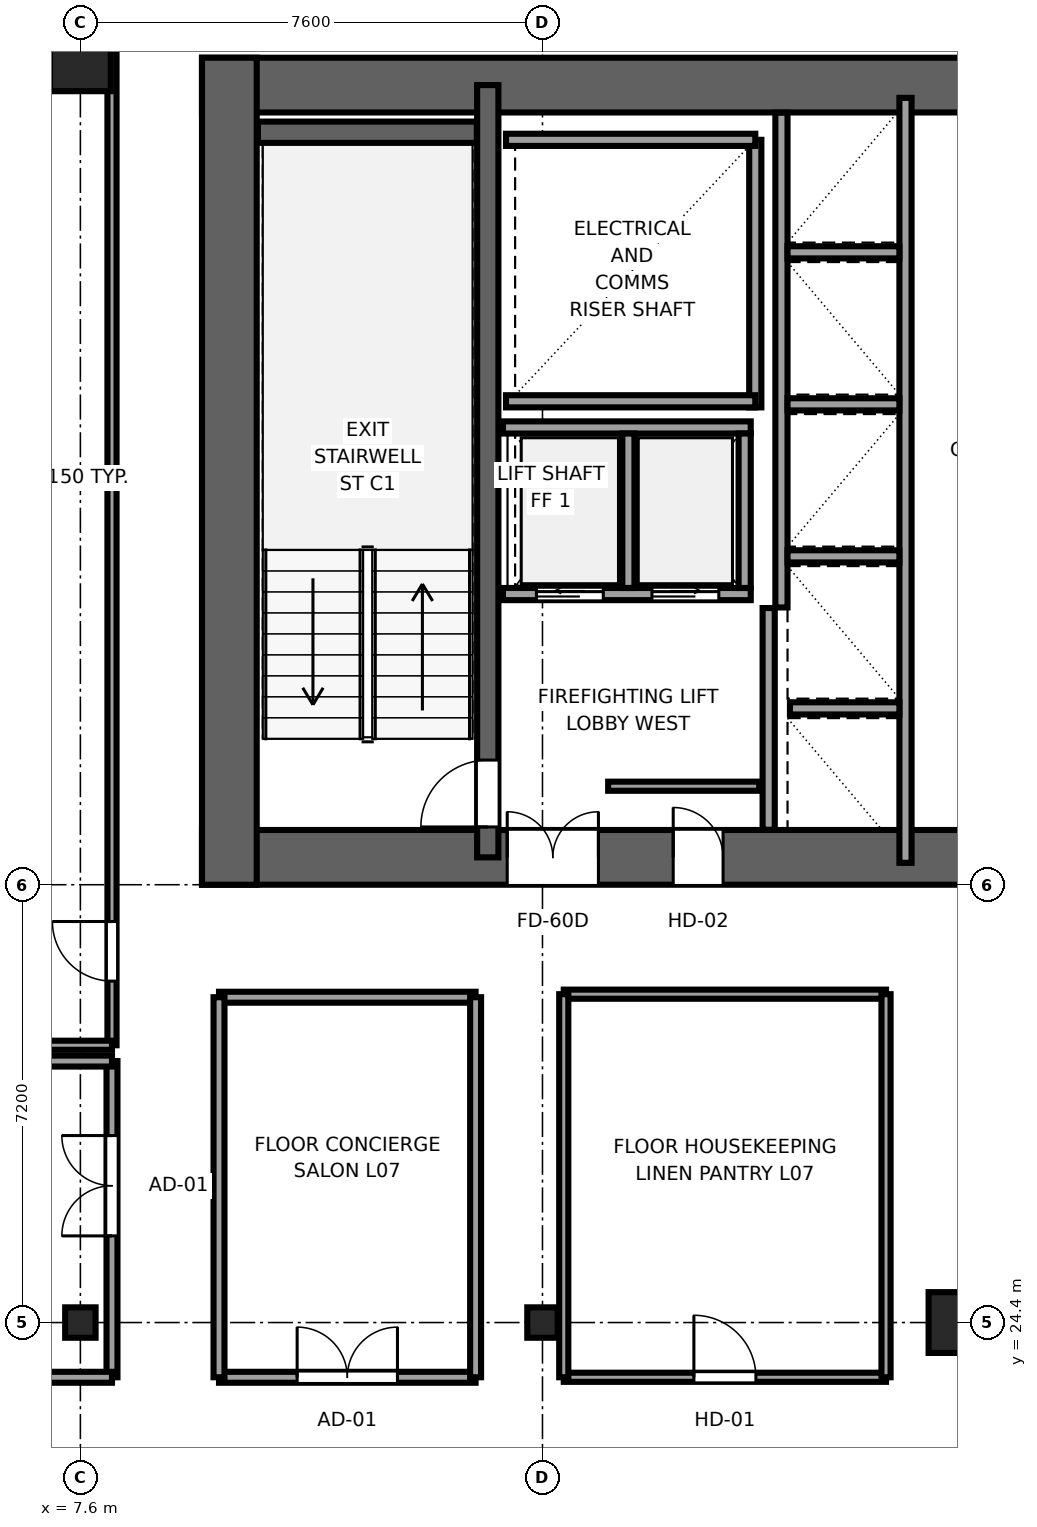
"""IFC4 building model, lengths in metres.
Left out: names, types, materials, properties, quantities, classifications, styles, units other than length and angle.
Written with IfcOpenShell. Run it as: python <this file> out.ifc"""

import sys

from ifc_helpers import new_model, si_unit, direction, frame, frame_2d, origin, origin_2d, place, context, subcontext, project, spatial, rectangle, i_section, extrude, source, transform, mapped, element, fill, save


model = new_model("IFC4")
c1 = context("Model", 3, precision=1e-05, world=origin(), true_north=direction((0.0, 1.0)))
c2 = subcontext(c1, "Body", "Model", "MODEL_VIEW")
j1 = project(units=[si_unit("LENGTHUNIT", "METRE"), si_unit("PLANEANGLEUNIT", "RADIAN")], contexts=[c1])
p1 = place(None, origin())
s1 = spatial("IfcSite", under=j1, at=p1, CompositionType="ELEMENT")
p2 = place(p1, origin())
s2 = spatial("IfcBuilding", under=s1, at=p2, CompositionType="ELEMENT")
p3 = place(p2, frame((0.0, 0.0, 35.55)))
s3 = spatial("IfcBuildingStorey", under=s2, at=p3, CompositionType="ELEMENT", Elevation=35.55)
p4 = place(p3, frame((9.6, 32.05, 0.0), z_axis=(0.0, 0.0, 1.0), x_axis=(1.0, 0.0, 0.0)))
e1 = element("IfcWall", 1, at=p4, inside=s3, PredefinedType="SHEAR", context=c2, shape_type="SweptSolid", body=[
    extrude(rectangle(XDim=26.8, YDim=0.9, at=frame_2d((13.4, 0.0))), origin(), (0.0, 0.0, 1.0), 3.55),
])
p5 = place(p4, frame((6.52, 0.0, 0.0), z_axis=(0.0, 0.0, 1.0), x_axis=(-1.0, 0.0, 0.0)))
e2 = element("IfcOpeningElement", 2, at=p5, cuts=e1, PredefinedType="OPENING", context=c2, shape_type="SweptSolid", body=[
    extrude(rectangle(XDim=1.5, YDim=2.04, at=frame_2d((0.75, 1.02))), frame((0.0, 0.46, 0.0), z_axis=(0.0, -1.0, 0.0), x_axis=(1.0, 0.0, 0.0)), (0.0, 0.0, 1.0), 0.92),
])
p6 = place(p4, frame((14.15, 0.0, 0.0), z_axis=(0.0, 0.0, 1.0), x_axis=(-1.0, 0.0, 0.0)))
e3 = element("IfcOpeningElement", 3, at=p6, cuts=e1, PredefinedType="OPENING", context=c2, shape_type="SweptSolid", body=[
    extrude(rectangle(XDim=1.5, YDim=2.04, at=frame_2d((0.75, 1.02))), frame((0.0, 0.46, 0.0), z_axis=(0.0, -1.0, 0.0), x_axis=(1.0, 0.0, 0.0)), (0.0, 0.0, 1.0), 0.92),
])
p7 = place(p4, frame((20.45, 0.0, 0.0), z_axis=(0.0, 0.0, 1.0), x_axis=(-1.0, 0.0, 0.0)))
e4 = element("IfcOpeningElement", 4, at=p7, cuts=e1, PredefinedType="OPENING", context=c2, shape_type="SweptSolid", body=[
    extrude(rectangle(XDim=1.5, YDim=2.04, at=frame_2d((0.75, 1.02))), frame((0.0, 0.46, 0.0), z_axis=(0.0, -1.0, 0.0), x_axis=(1.0, 0.0, 0.0)), (0.0, 0.0, 1.0), 0.92),
])
p8 = place(p4, frame((8.57, 0.0, 0.0), z_axis=(0.0, 0.0, 1.0), x_axis=(-1.0, 0.0, 0.0)))
e5 = element("IfcOpeningElement", 5, at=p8, cuts=e1, PredefinedType="OPENING", context=c2, shape_type="SweptSolid", body=[
    extrude(rectangle(XDim=0.82, YDim=2.01, at=frame_2d((0.41, 1.005))), frame((0.0, 0.46, 0.0), z_axis=(0.0, -1.0, 0.0), x_axis=(1.0, 0.0, 0.0)), (0.0, 0.0, 1.0), 0.92),
])
p9 = place(p3, frame((9.6, 44.75, 0.0), z_axis=(0.0, 0.0, 1.0), x_axis=(1.0, 0.0, 0.0)))
e6 = element("IfcWall", 6, at=p9, inside=s3, PredefinedType="SHEAR", context=c2, shape_type="SweptSolid", body=[
    extrude(rectangle(XDim=26.8, YDim=0.9, at=frame_2d((13.4, 0.0))), origin(), (0.0, 0.0, 1.0), 3.55),
])
p10 = place(p3, frame((10.05, 31.6, 0.0), z_axis=(0.0, 0.0, 1.0), x_axis=(0.0, 1.0, 0.0)))
e7 = element("IfcWall", 7, at=p10, inside=s3, PredefinedType="SHEAR", context=c2, shape_type="SweptSolid", body=[
    extrude(rectangle(XDim=13.6, YDim=0.9, at=frame_2d((6.8, 0.0))), origin(), (0.0, 0.0, 1.0), 3.55),
])
p11 = place(p3, frame((14.3, 32.05, 0.0), z_axis=(0.0, 0.0, 1.0), x_axis=(0.0, 1.0, 0.0)))
e8 = element("IfcWall", 8, at=p11, inside=s3, PredefinedType="SHEAR", context=c2, shape_type="SweptSolid", body=[
    extrude(rectangle(XDim=12.7, YDim=0.35, at=frame_2d((6.35, 0.0))), origin(), (0.0, 0.0, 1.0), 3.55),
])
p12 = place(p11, frame((0.5, 0.0, 0.0)))
e9 = element("IfcOpeningElement", 9, at=p12, cuts=e8, PredefinedType="OPENING", context=c2, shape_type="SweptSolid", body=[
    extrude(rectangle(XDim=1.1, YDim=2.12, at=frame_2d((0.55, 1.06))), frame((0.0, 0.185, 0.0), z_axis=(0.0, -1.0, 0.0), x_axis=(1.0, 0.0, 0.0)), (0.0, 0.0, 1.0), 0.37),
])
p13 = place(p3, frame((10.52, 43.975, 0.0), z_axis=(0.0, 0.0, 1.0), x_axis=(1.0, 0.0, 0.0)))
e10 = element("IfcWall", 10, at=p13, inside=s3, PredefinedType="SHEAR", context=c2, shape_type="SweptSolid", body=[
    extrude(rectangle(XDim=3.6, YDim=0.35, at=frame_2d((1.8, 0.0))), origin(), (0.0, 0.0, 1.0), 3.55),
])
m1 = source(origin(), c2, "Body", "SweptSolid", [
    extrude(i_section(OverallWidth=0.5, OverallDepth=0.5, WebThickness=0.028, FlangeThickness=0.045, at=origin_2d()), origin(), (0.0, 0.0, 1.0), 3.55),
])
for number, where, z_axis, x_axis in (
    (11, (7.6, 24.4, 0.0), (0.0, 0.0, 1.0), (1.0, 0.0, 0.0)),
    (12, (15.2, 24.4, 0.0), (0.0, 0.0, 1.0), (1.0, 0.0, 0.0)),
):
    element("IfcColumn", number, at=place(p3, frame(where, z_axis=z_axis, x_axis=x_axis)), inside=s3, PredefinedType="COLUMN", context=c2, shape_type="MappedRepresentation", body=[
        mapped(m1, transform((0.0, 0.0, 0.0), x_axis=(1.0, 0.0, 0.0), y_axis=(0.0, 1.0, 0.0), z_axis=(0.0, 0.0, 1.0), scale=1.0)),
    ])
m2 = source(origin(), c2, "Body", "SweptSolid", [
    extrude(rectangle(XDim=1.0, YDim=1.0, at=origin_2d()), origin(), (0.0, 0.0, 1.0), 3.55),
])
for number, where, z_axis, x_axis in (
    (13, (22.05, 24.4, 0.0), (0.0, 0.0, 1.0), (1.0, 0.0, 0.0)),
    (14, (7.6, 45.15, 0.0), (0.0, 0.0, 1.0), (1.0, 0.0, 0.0)),
):
    element("IfcColumn", number, at=place(p3, frame(where, z_axis=z_axis, x_axis=x_axis)), inside=s3, PredefinedType="COLUMN", context=c2, shape_type="MappedRepresentation", body=[
        mapped(m2, transform((0.0, 0.0, 0.0), x_axis=(1.0, 0.0, 0.0), y_axis=(0.0, 1.0, 0.0), z_axis=(0.0, 0.0, 1.0), scale=1.0)),
    ])
p14 = place(p3, frame((18.7, 39.45, 0.0), z_axis=(0.0, 0.0, 1.0), x_axis=(0.0, 1.0, 0.0)))
e15 = element("IfcWall", 15, at=p14, inside=s3, PredefinedType="SOLIDWALL", context=c2, shape_type="SweptSolid", body=[
    extrude(rectangle(XDim=4.4, YDim=0.2, at=frame_2d((2.2, 0.0))), origin(), (0.0, 0.0, 1.0), 3.37),
])
for number, where, z_axis, x_axis in (
    (16, (14.6, 39.55, 0.0), (0.0, 0.0, 1.0), (1.0, 0.0, 0.0)),
    (17, (14.6, 43.85, 0.0), (0.0, 0.0, 1.0), (1.0, 0.0, 0.0)),
):
    element("IfcWall", number, at=place(p3, frame(where, z_axis=z_axis, x_axis=x_axis)), inside=s3, PredefinedType="SOLIDWALL", context=c2, shape_type="SweptSolid", body=[
        extrude(rectangle(XDim=4.1, YDim=0.2, at=frame_2d((2.05, 0.0))), origin(), (0.0, 0.0, 1.0), 3.37),
    ])
p15 = place(p3, frame((18.92, 32.504, 0.0), z_axis=(0.0, 0.0, 1.0), x_axis=(0.0, 1.0, 0.0)))
e18 = element("IfcWall", 18, at=p15, inside=s3, PredefinedType="SOLIDWALL", context=c2, shape_type="SweptSolid", body=[
    extrude(rectangle(XDim=3.646, YDim=0.2, at=frame_2d((1.823, 0.0))), origin(), (0.0, 0.0, 1.0), 3.37),
])
p16 = place(p3, frame((21.17, 31.96, 0.0), z_axis=(0.0, 0.0, 1.0), x_axis=(0.0, 1.0, 0.0)))
e19 = element("IfcWall", 19, at=p16, inside=s3, PredefinedType="SOLIDWALL", context=c2, shape_type="SweptSolid", body=[
    extrude(rectangle(XDim=12.58, YDim=0.2, at=frame_2d((6.29, 0.0))), origin(), (0.0, 0.0, 1.0), 3.37),
])
p17 = place(p3, frame((19.13, 36.16, 0.0), z_axis=(0.0, 0.0, 1.0), x_axis=(0.0, 1.0, 0.0)))
e20 = element("IfcWall", 20, at=p17, inside=s3, PredefinedType="SOLIDWALL", context=c2, shape_type="SweptSolid", body=[
    extrude(rectangle(XDim=8.136, YDim=0.2, at=frame_2d((4.068, 0.0))), origin(), (0.0, 0.0, 1.0), 3.37),
])
p18 = place(p3, frame((19.27, 34.5, 0.0), z_axis=(0.0, 0.0, 1.0), x_axis=(1.0, 0.0, 0.0)))
e21 = element("IfcWall", 21, at=p18, inside=s3, PredefinedType="SOLIDWALL", context=c2, shape_type="SweptSolid", body=[
    extrude(rectangle(XDim=1.8, YDim=0.2, at=frame_2d((0.9, 0.0))), origin(), (0.0, 0.0, 1.0), 3.37),
])
for number, where, z_axis, x_axis in (
    (22, (19.23, 37.0, 0.0), (0.0, 0.0, 1.0), (1.0, 0.0, 0.0)),
    (23, (19.23, 39.5, 0.0), (0.0, 0.0, 1.0), (1.0, 0.0, 0.0)),
    (24, (19.23, 42.0, 0.0), (0.0, 0.0, 1.0), (1.0, 0.0, 0.0)),
):
    element("IfcWall", number, at=place(p3, frame(where, z_axis=z_axis, x_axis=x_axis)), inside=s3, PredefinedType="SOLIDWALL", context=c2, shape_type="SweptSolid", body=[
        extrude(rectangle(XDim=1.84, YDim=0.2, at=frame_2d((0.92, 0.0))), origin(), (0.0, 0.0, 1.0), 3.37),
    ])
p19 = place(p3, frame((14.55, 36.38, 0.0), z_axis=(0.0, 0.0, 1.0), x_axis=(1.0, 0.0, 0.0)))
e25 = element("IfcWall", 25, at=p19, inside=s3, PredefinedType="SOLIDWALL", context=c2, shape_type="SweptSolid", body=[
    extrude(rectangle(XDim=4.075, YDim=0.2, at=frame_2d((2.038, 0.0))), origin(), (0.0, 0.0, 1.0), 3.37),
])
p20 = place(p19, frame((0.55, 0.0, 0.0)))
e26 = element("IfcOpeningElement", 26, at=p20, cuts=e25, PredefinedType="OPENING", context=c2, shape_type="SweptSolid", body=[
    extrude(rectangle(XDim=1.1, YDim=2.12, at=frame_2d((0.55, 1.06))), frame((0.0, 0.11, 0.0), z_axis=(0.0, -1.0, 0.0), x_axis=(1.0, 0.0, 0.0)), (0.0, 0.0, 1.0), 0.22),
])
p21 = place(p19, frame((2.45, 0.0, 0.0)))
e27 = element("IfcOpeningElement", 27, at=p21, cuts=e25, PredefinedType="OPENING", context=c2, shape_type="SweptSolid", body=[
    extrude(rectangle(XDim=1.1, YDim=2.12, at=frame_2d((0.55, 1.06))), frame((0.0, 0.11, 0.0), z_axis=(0.0, -1.0, 0.0), x_axis=(1.0, 0.0, 0.0)), (0.0, 0.0, 1.0), 0.22),
])
p22 = place(p3, frame((14.55, 39.12, 0.0), z_axis=(0.0, 0.0, 1.0), x_axis=(1.0, 0.0, 0.0)))
e28 = element("IfcWall", 28, at=p22, inside=s3, PredefinedType="SOLIDWALL", context=c2, shape_type="SweptSolid", body=[
    extrude(rectangle(XDim=4.075, YDim=0.2, at=frame_2d((2.038, 0.0))), origin(), (0.0, 0.0, 1.0), 3.37),
])
for number, where, z_axis, x_axis in (
    (29, (18.525, 36.48, 0.0), (0.0, 0.0, 1.0), (0.0, 1.0, 0.0)),
    (30, (16.613, 36.48, 0.0), (0.0, 0.0, 1.0), (0.0, 1.0, 0.0)),
):
    element("IfcWall", number, at=place(p3, frame(where, z_axis=z_axis, x_axis=x_axis)), inside=s3, PredefinedType="SOLIDWALL", context=c2, shape_type="SweptSolid", body=[
        extrude(rectangle(XDim=2.54, YDim=0.2, at=frame_2d((1.27, 0.0))), origin(), (0.0, 0.0, 1.0), 3.37),
    ])
p23 = place(p3, frame((16.28, 33.22, 0.0), z_axis=(0.0, 0.0, 1.0), x_axis=(1.0, 0.0, 0.0)))
e31 = element("IfcWall", 31, at=p23, inside=s3, PredefinedType="PARTITIONING", context=c2, shape_type="SweptSolid", body=[
    extrude(rectangle(XDim=2.485, YDim=0.15, at=frame_2d((1.242, 0.0))), origin(), (0.0, 0.0, 1.0), 3.37),
])
p24 = place(p3, frame((8.12, 23.5, 0.0), z_axis=(0.0, 0.0, 1.0), x_axis=(0.0, 1.0, 0.0)))
e32 = element("IfcWall", 32, at=p24, inside=s3, PredefinedType="PARTITIONING", context=c2, shape_type="SweptSolid", body=[
    extrude(rectangle(XDim=5.2, YDim=0.18, at=frame_2d((2.6, 0.0))), origin(), (0.0, 0.0, 1.0), 3.37),
])
p25 = place(p24, frame((2.325, 0.0, 0.0)))
e33 = element("IfcOpeningElement", 33, at=p25, cuts=e32, PredefinedType="OPENING", context=c2, shape_type="SweptSolid", body=[
    extrude(rectangle(XDim=1.65, YDim=2.15, at=frame_2d((0.825, 1.075))), frame((0.0, 0.1, 0.0), z_axis=(0.0, -1.0, 0.0), x_axis=(1.0, 0.0, 0.0)), (0.0, 0.0, 1.0), 0.2),
])
for number, where, z_axis, x_axis in (
    (34, (0.405, 23.5, 0.0), (0.0, 0.0, 1.0), (1.0, 0.0, 0.0)),
    (35, (0.405, 28.7, 0.0), (0.0, 0.0, 1.0), (1.0, 0.0, 0.0)),
):
    element("IfcWall", number, at=place(p3, frame(where, z_axis=z_axis, x_axis=x_axis)), inside=s3, PredefinedType="PARTITIONING", context=c2, shape_type="SweptSolid", body=[
        extrude(rectangle(XDim=7.715, YDim=0.18, at=frame_2d((3.857, 0.0))), origin(), (0.0, 0.0, 1.0), 3.37),
    ])
p26 = place(p3, frame((8.12, 28.96, 0.0), z_axis=(0.0, 0.0, 1.0), x_axis=(0.0, 1.0, 0.0)))
e36 = element("IfcWall", 36, at=p26, inside=s3, PredefinedType="PARTITIONING", context=c2, shape_type="SweptSolid", body=[
    extrude(rectangle(XDim=16.635, YDim=0.15, at=frame_2d((8.317, 0.0))), origin(), (0.0, 0.0, 1.0), 3.37),
])
p27 = place(p26, frame((1.055, 0.0, 0.0)))
e37 = element("IfcOpeningElement", 37, at=p27, cuts=e36, PredefinedType="OPENING", context=c2, shape_type="SweptSolid", body=[
    extrude(rectangle(XDim=0.98, YDim=2.12, at=frame_2d((0.49, 1.06))), frame((0.0, 0.085, 0.0), z_axis=(0.0, -1.0, 0.0), x_axis=(1.0, 0.0, 0.0)), (0.0, 0.0, 1.0), 0.17),
])
p28 = place(p3, frame((2.77, 28.96, 0.0), z_axis=(0.0, 0.0, 1.0), x_axis=(1.0, 0.0, 0.0)))
e38 = element("IfcWall", 38, at=p28, inside=s3, PredefinedType="PARTITIONING", context=c2, shape_type="SweptSolid", body=[
    extrude(rectangle(XDim=5.35, YDim=0.15, at=frame_2d((2.675, 0.0))), origin(), (0.0, 0.0, 1.0), 3.37),
])
p29 = place(p3, frame((9.88, 23.5, 0.0), z_axis=(0.0, 0.0, 1.0), x_axis=(1.0, 0.0, 0.0)))
e39 = element("IfcWall", 39, at=p29, inside=s3, PredefinedType="PARTITIONING", context=c2, shape_type="SweptSolid", body=[
    extrude(rectangle(XDim=4.22, YDim=0.18, at=frame_2d((2.11, 0.0))), origin(), (0.0, 0.0, 1.0), 3.37),
])
p30 = place(p29, frame((1.285, 0.0, 0.0)))
e40 = element("IfcOpeningElement", 40, at=p30, cuts=e39, PredefinedType="OPENING", context=c2, shape_type="SweptSolid", body=[
    extrude(rectangle(XDim=1.65, YDim=2.15, at=frame_2d((0.825, 1.075))), frame((0.0, 0.1, 0.0), z_axis=(0.0, -1.0, 0.0), x_axis=(1.0, 0.0, 0.0)), (0.0, 0.0, 1.0), 0.2),
])
p31 = place(p3, frame((9.88, 29.75, 0.0), z_axis=(0.0, 0.0, 1.0), x_axis=(1.0, 0.0, 0.0)))
e41 = element("IfcWall", 41, at=p31, inside=s3, PredefinedType="PARTITIONING", context=c2, shape_type="SweptSolid", body=[
    extrude(rectangle(XDim=4.22, YDim=0.18, at=frame_2d((2.11, 0.0))), origin(), (0.0, 0.0, 1.0), 3.37),
])
for number, where, z_axis, x_axis in (
    (42, (9.88, 23.5, 0.0), (0.0, 0.0, 1.0), (0.0, 1.0, 0.0)),
    (43, (14.1, 23.5, 0.0), (0.0, 0.0, 1.0), (0.0, 1.0, 0.0)),
):
    element("IfcWall", number, at=place(p3, frame(where, z_axis=z_axis, x_axis=x_axis)), inside=s3, PredefinedType="PARTITIONING", context=c2, shape_type="SweptSolid", body=[
        extrude(rectangle(XDim=6.25, YDim=0.18, at=frame_2d((3.125, 0.0))), origin(), (0.0, 0.0, 1.0), 3.37),
    ])
p32 = place(p3, frame((15.55, 23.5, 0.0), z_axis=(0.0, 0.0, 1.0), x_axis=(1.0, 0.0, 0.0)))
e44 = element("IfcWall", 44, at=p32, inside=s3, PredefinedType="PARTITIONING", context=c2, shape_type="SweptSolid", body=[
    extrude(rectangle(XDim=5.3, YDim=0.15, at=frame_2d((2.65, 0.0))), origin(), (0.0, 0.0, 1.0), 3.37),
])
p33 = place(p32, frame((2.14, 0.0, 0.0)))
e45 = element("IfcOpeningElement", 45, at=p33, cuts=e44, PredefinedType="OPENING", context=c2, shape_type="SweptSolid", body=[
    extrude(rectangle(XDim=1.02, YDim=2.03, at=frame_2d((0.51, 1.015))), frame((0.0, 0.085, 0.0), z_axis=(0.0, -1.0, 0.0), x_axis=(1.0, 0.0, 0.0)), (0.0, 0.0, 1.0), 0.17),
])
p34 = place(p3, frame((15.55, 29.8, 0.0), z_axis=(0.0, 0.0, 1.0), x_axis=(1.0, 0.0, 0.0)))
e46 = element("IfcWall", 46, at=p34, inside=s3, PredefinedType="PARTITIONING", context=c2, shape_type="SweptSolid", body=[
    extrude(rectangle(XDim=5.3, YDim=0.15, at=frame_2d((2.65, 0.0))), origin(), (0.0, 0.0, 1.0), 3.37),
])
for number, where, z_axis, x_axis in (
    (47, (15.55, 23.5, 0.0), (0.0, 0.0, 1.0), (0.0, 1.0, 0.0)),
    (48, (20.85, 23.5, 0.0), (0.0, 0.0, 1.0), (0.0, 1.0, 0.0)),
):
    element("IfcWall", number, at=place(p3, frame(where, z_axis=z_axis, x_axis=x_axis)), inside=s3, PredefinedType="PARTITIONING", context=c2, shape_type="SweptSolid", body=[
        extrude(rectangle(XDim=6.3, YDim=0.15, at=frame_2d((3.15, 0.0))), origin(), (0.0, 0.0, 1.0), 3.37),
    ])
m3 = source(origin(), c2, "Body", "SweptSolid", [
    extrude(rectangle(XDim=1.1, YDim=2.12, at=frame_2d((0.55, 1.06))), frame((0.0, 0.025, 0.0), z_axis=(0.0, -1.0, 0.0), x_axis=(1.0, 0.0, 0.0)), (0.0, 0.0, 1.0), 0.05),
])
p35 = place(p12, origin())
e49 = element("IfcDoor", 49, at=p35, inside=s3, OperationType="SINGLE_SWING_LEFT", PredefinedType="DOOR", context=c2, shape_type="MappedRepresentation", body=[
    mapped(m3, transform((0.0, 0.0, 0.0), x_axis=(1.0, 0.0, 0.0), y_axis=(0.0, 1.0, 0.0), z_axis=(0.0, 0.0, 1.0), scale=1.0)),
])
fill(e9, e49)
m4 = source(origin(), c2, "Body", "SweptSolid", [
    extrude(rectangle(XDim=1.5, YDim=2.04, at=frame_2d((0.75, 1.02))), frame((0.0, 0.025, 0.0), z_axis=(0.0, -1.0, 0.0), x_axis=(1.0, 0.0, 0.0)), (0.0, 0.0, 1.0), 0.05),
])
p36 = place(p5, origin())
e50 = element("IfcDoor", 50, at=p36, inside=s3, OperationType="DOUBLE_DOOR_SINGLE_SWING", PredefinedType="DOOR", context=c2, shape_type="MappedRepresentation", body=[
    mapped(m4, transform((0.0, 0.0, 0.0), x_axis=(1.0, 0.0, 0.0), y_axis=(0.0, 1.0, 0.0), z_axis=(0.0, 0.0, 1.0), scale=1.0)),
])
fill(e2, e50)
m5 = source(origin(), c2, "Body", "SweptSolid", [
    extrude(rectangle(XDim=0.82, YDim=2.01, at=frame_2d((0.41, 1.005))), frame((0.0, 0.025, 0.0), z_axis=(0.0, -1.0, 0.0), x_axis=(1.0, 0.0, 0.0)), (0.0, 0.0, 1.0), 0.05),
])
p37 = place(p8, origin())
e51 = element("IfcDoor", 51, at=p37, inside=s3, OperationType="SINGLE_SWING_LEFT", PredefinedType="DOOR", context=c2, shape_type="MappedRepresentation", body=[
    mapped(m5, transform((0.0, 0.0, 0.0), x_axis=(1.0, 0.0, 0.0), y_axis=(0.0, 1.0, 0.0), z_axis=(0.0, 0.0, 1.0), scale=1.0)),
])
fill(e5, e51)
m6 = source(origin(), c2, "Body", "SweptSolid", [
    extrude(rectangle(XDim=1.1, YDim=2.12, at=frame_2d((0.55, 1.06))), frame((0.0, 0.025, 0.0), z_axis=(0.0, -1.0, 0.0), x_axis=(1.0, 0.0, 0.0)), (0.0, 0.0, 1.0), 0.05),
])
p38 = place(p20, origin())
e52 = element("IfcDoor", 52, at=p38, inside=s3, OperationType="SLIDING_TO_LEFT", PredefinedType="DOOR", context=c2, shape_type="MappedRepresentation", body=[
    mapped(m6, transform((0.0, 0.0, 0.0), x_axis=(1.0, 0.0, 0.0), y_axis=(0.0, 1.0, 0.0), z_axis=(0.0, 0.0, 1.0), scale=1.0)),
])
fill(e26, e52)
p39 = place(p21, origin())
e53 = element("IfcDoor", 53, at=p39, inside=s3, OperationType="SLIDING_TO_RIGHT", PredefinedType="DOOR", context=c2, shape_type="MappedRepresentation", body=[
    mapped(m6, transform((0.0, 0.0, 0.0), x_axis=(1.0, 0.0, 0.0), y_axis=(0.0, 1.0, 0.0), z_axis=(0.0, 0.0, 1.0), scale=1.0)),
])
fill(e27, e53)
m7 = source(origin(), c2, "Body", "SweptSolid", [
    extrude(rectangle(XDim=1.65, YDim=2.15, at=frame_2d((0.825, 1.075))), frame((0.0, 0.025, 0.0), z_axis=(0.0, -1.0, 0.0), x_axis=(1.0, 0.0, 0.0)), (0.0, 0.0, 1.0), 0.05),
])
p40 = place(p25, origin())
e54 = element("IfcDoor", 54, at=p40, inside=s3, OperationType="DOUBLE_DOOR_SINGLE_SWING", PredefinedType="DOOR", context=c2, shape_type="MappedRepresentation", body=[
    mapped(m7, transform((0.0, 0.0, 0.0), x_axis=(1.0, 0.0, 0.0), y_axis=(0.0, 1.0, 0.0), z_axis=(0.0, 0.0, 1.0), scale=1.0)),
])
fill(e33, e54)
m8 = source(origin(), c2, "Body", "SweptSolid", [
    extrude(rectangle(XDim=0.98, YDim=2.12, at=frame_2d((0.49, 1.06))), frame((0.0, 0.025, 0.0), z_axis=(0.0, -1.0, 0.0), x_axis=(1.0, 0.0, 0.0)), (0.0, 0.0, 1.0), 0.05),
])
p41 = place(p27, origin())
e55 = element("IfcDoor", 55, at=p41, inside=s3, OperationType="SINGLE_SWING_RIGHT", PredefinedType="DOOR", context=c2, shape_type="MappedRepresentation", body=[
    mapped(m8, transform((0.0, 0.0, 0.0), x_axis=(1.0, 0.0, 0.0), y_axis=(0.0, 1.0, 0.0), z_axis=(0.0, 0.0, 1.0), scale=1.0)),
])
fill(e37, e55)
p42 = place(p30, origin())
e56 = element("IfcDoor", 56, at=p42, inside=s3, OperationType="DOUBLE_DOOR_SINGLE_SWING", PredefinedType="DOOR", context=c2, shape_type="MappedRepresentation", body=[
    mapped(m7, transform((0.0, 0.0, 0.0), x_axis=(1.0, 0.0, 0.0), y_axis=(0.0, 1.0, 0.0), z_axis=(0.0, 0.0, 1.0), scale=1.0)),
])
fill(e40, e56)
m9 = source(origin(), c2, "Body", "SweptSolid", [
    extrude(rectangle(XDim=1.02, YDim=2.03, at=frame_2d((0.51, 1.015))), frame((0.0, 0.025, 0.0), z_axis=(0.0, -1.0, 0.0), x_axis=(1.0, 0.0, 0.0)), (0.0, 0.0, 1.0), 0.05),
])
p43 = place(p33, origin())
e57 = element("IfcDoor", 57, at=p43, inside=s3, OperationType="SINGLE_SWING_LEFT", PredefinedType="DOOR", context=c2, shape_type="MappedRepresentation", body=[
    mapped(m9, transform((0.0, 0.0, 0.0), x_axis=(1.0, 0.0, 0.0), y_axis=(0.0, 1.0, 0.0), z_axis=(0.0, 0.0, 1.0), scale=1.0)),
])
fill(e45, e57)
save(model, sys.argv[1])
